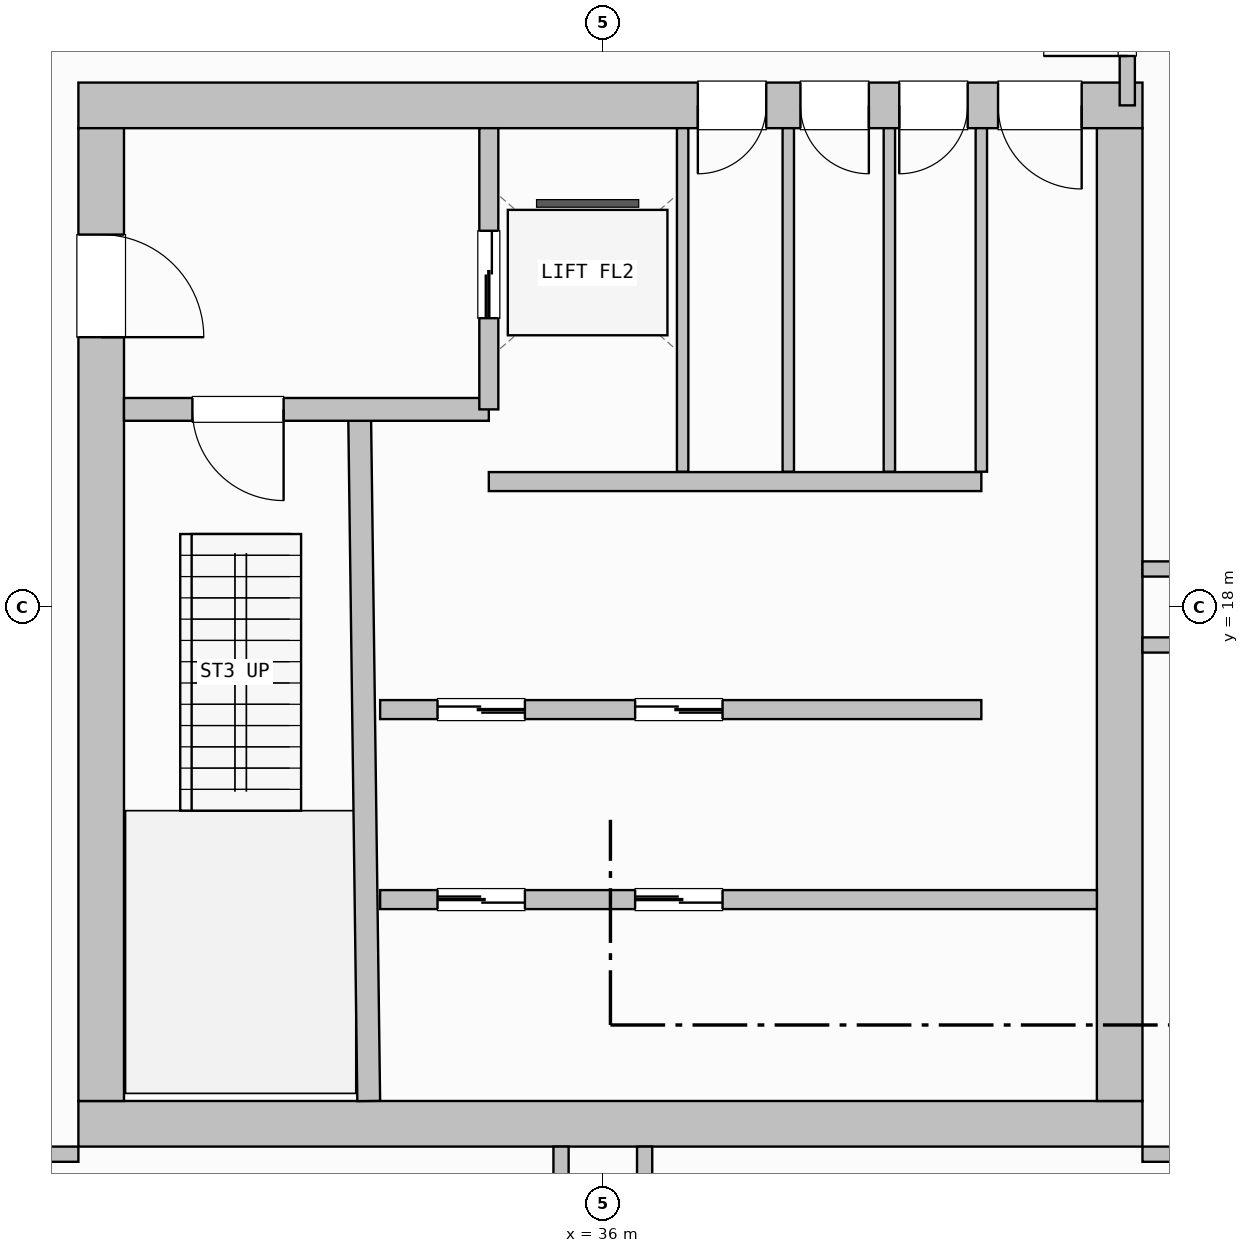
"""IFC4 building model, lengths in metres.
Left out: names, types, materials, properties, quantities, classifications, styles, units other than length and angle.
Written with IfcOpenShell. Run it as: python <this file> out.ifc"""

import sys

from ifc_helpers import new_model, si_unit, direction, frame, frame_2d, origin, place, context, subcontext, project, spatial, rectangle, extrude, element, fill, save


model = new_model("IFC4")
c1 = context("Model", 3, precision=1e-05, world=origin(), true_north=direction((0.0, 1.0)))
c2 = subcontext(c1, "Body", "Model", "MODEL_VIEW")
j1 = project(units=[si_unit("LENGTHUNIT", "METRE"), si_unit("PLANEANGLEUNIT", "RADIAN")], contexts=[c1])
p1 = place(None, origin())
s1 = spatial("IfcSite", under=j1, at=p1, CompositionType="ELEMENT")
p2 = place(p1, origin())
s2 = spatial("IfcBuilding", under=s1, at=p2, CompositionType="ELEMENT")
p3 = place(p2, frame((0.0, 0.0, 100.2)))
s3 = spatial("IfcBuildingStorey", under=s2, at=p3, CompositionType="ELEMENT", Elevation=100.2)
p4 = place(p3, frame((29.1, 11.2, 0.0), z_axis=(0.0, 0.0, 1.0), x_axis=(1.0, 0.0, 0.0)))
e1 = element("IfcWall", 1, at=p4, inside=s3, PredefinedType="SHEAR", context=c2, shape_type="SweptSolid", body=[
    extrude(rectangle(XDim=14.0, YDim=0.6, at=frame_2d((7.0, 0.0))), origin(), (0.0, 0.0, 1.0), 4.47),
])
p5 = place(p3, frame((43.1, 24.6, 0.0), z_axis=(0.0, 0.0, 1.0), x_axis=(-1.0, 0.0, 0.0)))
e2 = element("IfcWall", 2, at=p5, inside=s3, PredefinedType="SHEAR", context=c2, shape_type="SweptSolid", body=[
    extrude(rectangle(XDim=14.0, YDim=0.6, at=frame_2d((7.0, 0.0))), origin(), (0.0, 0.0, 1.0), 4.47),
])
p6 = place(p5, frame((0.8, 0.0, 0.0)))
e3 = element("IfcOpeningElement", 3, at=p6, cuts=e2, PredefinedType="OPENING", context=c2, shape_type="SweptSolid", body=[
    extrude(rectangle(XDim=1.1, YDim=2.15, at=frame_2d((0.55, 1.075))), frame((0.0, 0.31, 0.0), z_axis=(0.0, -1.0, 0.0), x_axis=(1.0, 0.0, 0.0)), (0.0, 0.0, 1.0), 0.62),
])
p7 = place(p5, frame((2.3, 0.0, 0.0)))
e4 = element("IfcOpeningElement", 4, at=p7, cuts=e2, PredefinedType="OPENING", context=c2, shape_type="SweptSolid", body=[
    extrude(rectangle(XDim=0.9, YDim=2.1, at=frame_2d((0.45, 1.05))), frame((0.0, 0.31, 0.0), z_axis=(0.0, -1.0, 0.0), x_axis=(1.0, 0.0, 0.0)), (0.0, 0.0, 1.0), 0.62),
])
p8 = place(p5, frame((3.6, 0.0, 0.0)))
e5 = element("IfcOpeningElement", 5, at=p8, cuts=e2, PredefinedType="OPENING", context=c2, shape_type="SweptSolid", body=[
    extrude(rectangle(XDim=0.9, YDim=2.1, at=frame_2d((0.45, 1.05))), frame((0.0, 0.31, 0.0), z_axis=(0.0, -1.0, 0.0), x_axis=(1.0, 0.0, 0.0)), (0.0, 0.0, 1.0), 0.62),
])
p9 = place(p5, frame((4.95, 0.0, 0.0)))
e6 = element("IfcOpeningElement", 6, at=p9, cuts=e2, PredefinedType="OPENING", context=c2, shape_type="SweptSolid", body=[
    extrude(rectangle(XDim=0.9, YDim=2.1, at=frame_2d((0.45, 1.05))), frame((0.0, 0.31, 0.0), z_axis=(0.0, -1.0, 0.0), x_axis=(1.0, 0.0, 0.0)), (0.0, 0.0, 1.0), 0.62),
])
p10 = place(p3, frame((29.4, 24.3, 0.0), z_axis=(0.0, 0.0, 1.0), x_axis=(0.0, -1.0, 0.0)))
e7 = element("IfcWall", 7, at=p10, inside=s3, PredefinedType="SHEAR", context=c2, shape_type="SweptSolid", body=[
    extrude(rectangle(XDim=12.8, YDim=0.6, at=frame_2d((6.4, 0.0))), origin(), (0.0, 0.0, 1.0), 4.47),
])
p11 = place(p10, frame((1.4, 0.0, 0.0)))
e8 = element("IfcOpeningElement", 8, at=p11, cuts=e7, PredefinedType="OPENING", context=c2, shape_type="SweptSolid", body=[
    extrude(rectangle(XDim=1.35, YDim=2.15, at=frame_2d((0.675, 1.075))), frame((0.0, 0.31, 0.0), z_axis=(0.0, -1.0, 0.0), x_axis=(1.0, 0.0, 0.0)), (0.0, 0.0, 1.0), 0.62),
])
p12 = place(p3, frame((42.8, 11.5, 0.0), z_axis=(0.0, 0.0, 1.0), x_axis=(0.0, 1.0, 0.0)))
e9 = element("IfcWall", 9, at=p12, inside=s3, PredefinedType="SHEAR", context=c2, shape_type="SweptSolid", body=[
    extrude(rectangle(XDim=12.8, YDim=0.6, at=frame_2d((6.4, 0.0))), origin(), (0.0, 0.0, 1.0), 4.47),
])
p13 = place(p3, frame((32.92, 11.5, 0.0), z_axis=(0.0, 0.0, 1.0), x_axis=(-0.013244407292, 0.999912288991, 0.0)))
e10 = element("IfcWall", 10, at=p13, inside=s3, PredefinedType="SHEAR", context=c2, shape_type="SweptSolid", body=[
    extrude(rectangle(XDim=9.051, YDim=0.3, at=frame_2d((4.525, 0.0))), origin(), (0.0, 0.0, 1.0), 4.47),
])
p14 = place(p3, frame((34.5, 20.6, 0.0), z_axis=(0.0, 0.0, 1.0), x_axis=(-1.0, 0.0, 0.0)))
e11 = element("IfcWall", 11, at=p14, inside=s3, PredefinedType="SHEAR", context=c2, shape_type="SweptSolid", body=[
    extrude(rectangle(XDim=4.8, YDim=0.3, at=frame_2d((2.4, 0.0))), origin(), (0.0, 0.0, 1.0), 4.47),
])
p15 = place(p14, frame((2.7, 0.0, 0.0)))
e12 = element("IfcOpeningElement", 12, at=p15, cuts=e11, PredefinedType="OPENING", context=c2, shape_type="SweptSolid", body=[
    extrude(rectangle(XDim=1.2, YDim=2.15, at=frame_2d((0.6, 1.075))), frame((0.0, 0.16, 0.0), z_axis=(0.0, -1.0, 0.0), x_axis=(1.0, 0.0, 0.0)), (0.0, 0.0, 1.0), 0.32),
])
p16 = place(p3, frame((34.5, 20.6, 0.0), z_axis=(0.0, 0.0, 1.0), x_axis=(0.0, 1.0, 0.0)))
e13 = element("IfcWall", 13, at=p16, inside=s3, PredefinedType="PARTITIONING", context=c2, shape_type="SweptSolid", body=[
    extrude(rectangle(XDim=3.7, YDim=0.25, at=frame_2d((1.85, 0.0))), origin(), (0.0, 0.0, 1.0), 4.47),
])
p17 = place(p16, frame((1.2, 0.0, 0.0)))
e14 = element("IfcOpeningElement", 14, at=p17, cuts=e13, PredefinedType="OPENING", context=c2, shape_type="SweptSolid", body=[
    extrude(rectangle(XDim=1.15, YDim=2.15, at=frame_2d((0.575, 1.075))), frame((0.0, 0.135, 0.0), z_axis=(0.0, -1.0, 0.0), x_axis=(1.0, 0.0, 0.0)), (0.0, 0.0, 1.0), 0.27),
])
p18 = place(p3, frame((34.5, 19.65, 0.0), z_axis=(0.0, 0.0, 1.0), x_axis=(1.0, 0.0, 0.0)))
e15 = element("IfcWall", 15, at=p18, inside=s3, PredefinedType="PARTITIONING", context=c2, shape_type="SweptSolid", body=[
    extrude(rectangle(XDim=6.48, YDim=0.25, at=frame_2d((3.24, 0.0))), origin(), (0.0, 0.0, 1.0), 4.47),
])
p19 = place(p3, frame((33.07, 14.15, 0.0), z_axis=(0.0, 0.0, 1.0), x_axis=(1.0, 0.0, 0.0)))
e16 = element("IfcWall", 16, at=p19, inside=s3, PredefinedType="PARTITIONING", context=c2, shape_type="SweptSolid", body=[
    extrude(rectangle(XDim=9.43, YDim=0.25, at=frame_2d((4.715, 0.0))), origin(), (0.0, 0.0, 1.0), 4.47),
])
p20 = place(p19, frame((0.755, 0.0, 0.0)))
e17 = element("IfcOpeningElement", 17, at=p20, cuts=e16, PredefinedType="OPENING", context=c2, shape_type="SweptSolid", body=[
    extrude(rectangle(XDim=1.15, YDim=2.15, at=frame_2d((0.575, 1.075))), frame((0.0, 0.135, 0.0), z_axis=(0.0, -1.0, 0.0), x_axis=(1.0, 0.0, 0.0)), (0.0, 0.0, 1.0), 0.27),
])
p21 = place(p19, frame((3.355, 0.0, 0.0)))
e18 = element("IfcOpeningElement", 18, at=p21, cuts=e16, PredefinedType="OPENING", context=c2, shape_type="SweptSolid", body=[
    extrude(rectangle(XDim=1.15, YDim=2.15, at=frame_2d((0.575, 1.075))), frame((0.0, 0.135, 0.0), z_axis=(0.0, -1.0, 0.0), x_axis=(1.0, 0.0, 0.0)), (0.0, 0.0, 1.0), 0.27),
])
p22 = place(p3, frame((40.98, 16.65, 0.0), z_axis=(0.0, 0.0, 1.0), x_axis=(-1.0, 0.0, 0.0)))
e19 = element("IfcWall", 19, at=p22, inside=s3, PredefinedType="PARTITIONING", context=c2, shape_type="SweptSolid", body=[
    extrude(rectangle(XDim=7.91, YDim=0.25, at=frame_2d((3.955, 0.0))), origin(), (0.0, 0.0, 1.0), 4.47),
])
p23 = place(p22, frame((6.005, 0.0, 0.0)))
e20 = element("IfcOpeningElement", 20, at=p23, cuts=e19, PredefinedType="OPENING", context=c2, shape_type="SweptSolid", body=[
    extrude(rectangle(XDim=1.15, YDim=2.15, at=frame_2d((0.575, 1.075))), frame((0.0, 0.135, 0.0), z_axis=(0.0, -1.0, 0.0), x_axis=(1.0, 0.0, 0.0)), (0.0, 0.0, 1.0), 0.27),
])
p24 = place(p22, frame((3.405, 0.0, 0.0)))
e21 = element("IfcOpeningElement", 21, at=p24, cuts=e19, PredefinedType="OPENING", context=c2, shape_type="SweptSolid", body=[
    extrude(rectangle(XDim=1.15, YDim=2.15, at=frame_2d((0.575, 1.075))), frame((0.0, 0.135, 0.0), z_axis=(0.0, -1.0, 0.0), x_axis=(1.0, 0.0, 0.0)), (0.0, 0.0, 1.0), 0.27),
])
for number, where, z_axis, x_axis in (
    (22, (37.05, 19.78, 0.0), (0.0, 0.0, 1.0), (0.0, 1.0, 0.0)),
    (23, (38.44, 19.78, 0.0), (0.0, 0.0, 1.0), (0.0, 1.0, 0.0)),
    (24, (39.77, 19.78, 0.0), (0.0, 0.0, 1.0), (0.0, 1.0, 0.0)),
    (25, (40.98, 19.78, 0.0), (0.0, 0.0, 1.0), (0.0, 1.0, 0.0)),
):
    element("IfcWall", number, at=place(p3, frame(where, z_axis=z_axis, x_axis=x_axis)), inside=s3, PredefinedType="PARTITIONING", context=c2, shape_type="SweptSolid", body=[
        extrude(rectangle(XDim=4.52, YDim=0.15, at=frame_2d((2.26, 0.0))), origin(), (0.0, 0.0, 1.0), 4.47),
    ])
p25 = place(p3, frame((27.45, 10.8, 0.0), z_axis=(0.0, 0.0, 1.0), x_axis=(1.0, 0.0, 0.0)))
e26 = element("IfcWall", 26, at=p25, inside=s3, PredefinedType="PARTITIONING", context=c2, shape_type="SweptSolid", body=[
    extrude(rectangle(XDim=1.65, YDim=0.2, at=frame_2d((0.825, 0.0))), origin(), (0.0, 0.0, 1.0), 4.47),
])
p26 = place(p3, frame((43.1, 10.8, 0.0), z_axis=(0.0, 0.0, 1.0), x_axis=(1.0, 0.0, 0.0)))
e27 = element("IfcWall", 27, at=p26, inside=s3, PredefinedType="PARTITIONING", context=c2, shape_type="SweptSolid", body=[
    extrude(rectangle(XDim=19.9, YDim=0.2, at=frame_2d((9.95, 0.0))), origin(), (0.0, 0.0, 1.0), 3.842),
])
p27 = place(p26, frame((4.5, 0.0, 0.0)))
e28 = element("IfcOpeningElement", 28, at=p27, cuts=e27, PredefinedType="OPENING", context=c2, shape_type="SweptSolid", body=[
    extrude(rectangle(XDim=1.0, YDim=2.15, at=frame_2d((0.5, 1.075))), frame((0.0, 0.11, 0.0), z_axis=(0.0, -1.0, 0.0), x_axis=(1.0, 0.0, 0.0)), (0.0, 0.0, 1.0), 0.22),
])
for number, where, z_axis, x_axis in (
    (29, (35.45, 9.0, 0.0), (0.0, 0.0, 1.0), (0.0, 1.0, 0.0)),
    (30, (36.55, 9.0, 0.0), (0.0, 0.0, 1.0), (0.0, 1.0, 0.0)),
):
    element("IfcWall", number, at=place(p3, frame(where, z_axis=z_axis, x_axis=x_axis)), inside=s3, PredefinedType="PARTITIONING", context=c2, shape_type="SweptSolid", body=[
        extrude(rectangle(XDim=1.9, YDim=0.2, at=frame_2d((0.95, 0.0))), origin(), (0.0, 0.0, 1.0), 3.677),
    ])
p28 = place(p3, frame((42.9, 24.6, 0.0), z_axis=(0.0, 0.0, 1.0), x_axis=(0.0, 1.0, 0.0)))
e31 = element("IfcWall", 31, at=p28, inside=s3, PredefinedType="PARTITIONING", context=c2, shape_type="SweptSolid", body=[
    extrude(rectangle(XDim=2.4, YDim=0.2, at=frame_2d((1.2, 0.0))), origin(), (0.0, 0.0, 1.0), 3.677),
])
p29 = place(p28, frame((0.65, 0.0, 0.0)))
e32 = element("IfcOpeningElement", 32, at=p29, cuts=e31, PredefinedType="OPENING", context=c2, shape_type="SweptSolid", body=[
    extrude(rectangle(XDim=1.1, YDim=2.15, at=frame_2d((0.55, 1.075))), frame((0.0, 0.11, 0.0), z_axis=(0.0, -1.0, 0.0), x_axis=(1.0, 0.0, 0.0)), (0.0, 0.0, 1.0), 0.22),
])
for number, where, z_axis, x_axis in (
    (33, (43.1, 18.5, 0.0), (0.0, 0.0, 1.0), (1.0, 0.0, 0.0)),
    (34, (43.1, 17.5, 0.0), (0.0, 0.0, 1.0), (1.0, 0.0, 0.0)),
):
    element("IfcWall", number, at=place(p3, frame(where, z_axis=z_axis, x_axis=x_axis)), inside=s3, PredefinedType="PARTITIONING", context=c2, shape_type="SweptSolid", body=[
        extrude(rectangle(XDim=2.1, YDim=0.2, at=frame_2d((1.05, 0.0))), origin(), (0.0, 0.0, 1.0), 3.842),
    ])
p30 = place(p15, origin())
e35 = element("IfcDoor", 35, at=p30, inside=s3, OperationType="SINGLE_SWING_LEFT", PredefinedType="DOOR", context=c2, shape_type="SweptSolid", body=[
    extrude(rectangle(XDim=1.2, YDim=2.15, at=frame_2d((0.6, 1.075))), frame((0.0, 0.025, 0.0), z_axis=(0.0, -1.0, 0.0), x_axis=(1.0, 0.0, 0.0)), (0.0, 0.0, 1.0), 0.05),
])
fill(e12, e35)
p31 = place(p11, origin())
e36 = element("IfcDoor", 36, at=p31, inside=s3, OperationType="SINGLE_SWING_RIGHT", PredefinedType="DOOR", context=c2, shape_type="SweptSolid", body=[
    extrude(rectangle(XDim=1.35, YDim=2.15, at=frame_2d((0.675, 1.075))), frame((0.0, 0.025, 0.0), z_axis=(0.0, -1.0, 0.0), x_axis=(1.0, 0.0, 0.0)), (0.0, 0.0, 1.0), 0.05),
])
fill(e8, e36)
p32 = place(p6, origin())
e37 = element("IfcDoor", 37, at=p32, inside=s3, OperationType="SINGLE_SWING_LEFT", PredefinedType="DOOR", context=c2, shape_type="SweptSolid", body=[
    extrude(rectangle(XDim=1.1, YDim=2.15, at=frame_2d((0.55, 1.075))), frame((0.0, 0.025, 0.0), z_axis=(0.0, -1.0, 0.0), x_axis=(1.0, 0.0, 0.0)), (0.0, 0.0, 1.0), 0.05),
])
fill(e3, e37)
p33 = place(p7, origin())
e38 = element("IfcDoor", 38, at=p33, inside=s3, OperationType="SINGLE_SWING_RIGHT", PredefinedType="DOOR", context=c2, shape_type="SweptSolid", body=[
    extrude(rectangle(XDim=0.9, YDim=2.1, at=frame_2d((0.45, 1.05))), frame((0.0, 0.025, 0.0), z_axis=(0.0, -1.0, 0.0), x_axis=(1.0, 0.0, 0.0)), (0.0, 0.0, 1.0), 0.05),
])
fill(e4, e38)
p34 = place(p8, origin())
e39 = element("IfcDoor", 39, at=p34, inside=s3, OperationType="SINGLE_SWING_LEFT", PredefinedType="DOOR", context=c2, shape_type="SweptSolid", body=[
    extrude(rectangle(XDim=0.9, YDim=2.1, at=frame_2d((0.45, 1.05))), frame((0.0, 0.025, 0.0), z_axis=(0.0, -1.0, 0.0), x_axis=(1.0, 0.0, 0.0)), (0.0, 0.0, 1.0), 0.05),
])
fill(e5, e39)
p35 = place(p9, origin())
e40 = element("IfcDoor", 40, at=p35, inside=s3, OperationType="SINGLE_SWING_RIGHT", PredefinedType="DOOR", context=c2, shape_type="SweptSolid", body=[
    extrude(rectangle(XDim=0.9, YDim=2.1, at=frame_2d((0.45, 1.05))), frame((0.0, 0.025, 0.0), z_axis=(0.0, -1.0, 0.0), x_axis=(1.0, 0.0, 0.0)), (0.0, 0.0, 1.0), 0.05),
])
fill(e6, e40)
p36 = place(p17, origin())
e41 = element("IfcDoor", 41, at=p36, inside=s3, OperationType="DOUBLE_DOOR_SLIDING", PredefinedType="DOOR", context=c2, shape_type="SweptSolid", body=[
    extrude(rectangle(XDim=1.15, YDim=2.15, at=frame_2d((0.575, 1.075))), frame((0.0, 0.025, 0.0), z_axis=(0.0, -1.0, 0.0), x_axis=(1.0, 0.0, 0.0)), (0.0, 0.0, 1.0), 0.05),
])
fill(e14, e41)
p37 = place(p20, origin())
e42 = element("IfcDoor", 42, at=p37, inside=s3, OperationType="DOUBLE_DOOR_SLIDING", PredefinedType="DOOR", context=c2, shape_type="SweptSolid", body=[
    extrude(rectangle(XDim=1.15, YDim=2.15, at=frame_2d((0.575, 1.075))), frame((0.0, 0.025, 0.0), z_axis=(0.0, -1.0, 0.0), x_axis=(1.0, 0.0, 0.0)), (0.0, 0.0, 1.0), 0.05),
])
fill(e17, e42)
p38 = place(p21, origin())
e43 = element("IfcDoor", 43, at=p38, inside=s3, OperationType="DOUBLE_DOOR_SLIDING", PredefinedType="DOOR", context=c2, shape_type="SweptSolid", body=[
    extrude(rectangle(XDim=1.15, YDim=2.15, at=frame_2d((0.575, 1.075))), frame((0.0, 0.025, 0.0), z_axis=(0.0, -1.0, 0.0), x_axis=(1.0, 0.0, 0.0)), (0.0, 0.0, 1.0), 0.05),
])
fill(e18, e43)
p39 = place(p23, origin())
e44 = element("IfcDoor", 44, at=p39, inside=s3, OperationType="DOUBLE_DOOR_SLIDING", PredefinedType="DOOR", context=c2, shape_type="SweptSolid", body=[
    extrude(rectangle(XDim=1.15, YDim=2.15, at=frame_2d((0.575, 1.075))), frame((0.0, 0.025, 0.0), z_axis=(0.0, -1.0, 0.0), x_axis=(1.0, 0.0, 0.0)), (0.0, 0.0, 1.0), 0.05),
])
fill(e20, e44)
p40 = place(p24, origin())
e45 = element("IfcDoor", 45, at=p40, inside=s3, OperationType="DOUBLE_DOOR_SLIDING", PredefinedType="DOOR", context=c2, shape_type="SweptSolid", body=[
    extrude(rectangle(XDim=1.15, YDim=2.15, at=frame_2d((0.575, 1.075))), frame((0.0, 0.025, 0.0), z_axis=(0.0, -1.0, 0.0), x_axis=(1.0, 0.0, 0.0)), (0.0, 0.0, 1.0), 0.05),
])
fill(e21, e45)
p41 = place(p29, origin())
e46 = element("IfcDoor", 46, at=p41, inside=s3, OperationType="SINGLE_SWING_LEFT", PredefinedType="DOOR", context=c2, shape_type="SweptSolid", body=[
    extrude(rectangle(XDim=1.1, YDim=2.15, at=frame_2d((0.55, 1.075))), frame((0.0, 0.025, 0.0), z_axis=(0.0, -1.0, 0.0), x_axis=(1.0, 0.0, 0.0)), (0.0, 0.0, 1.0), 0.05),
])
fill(e32, e46)
save(model, sys.argv[1])
